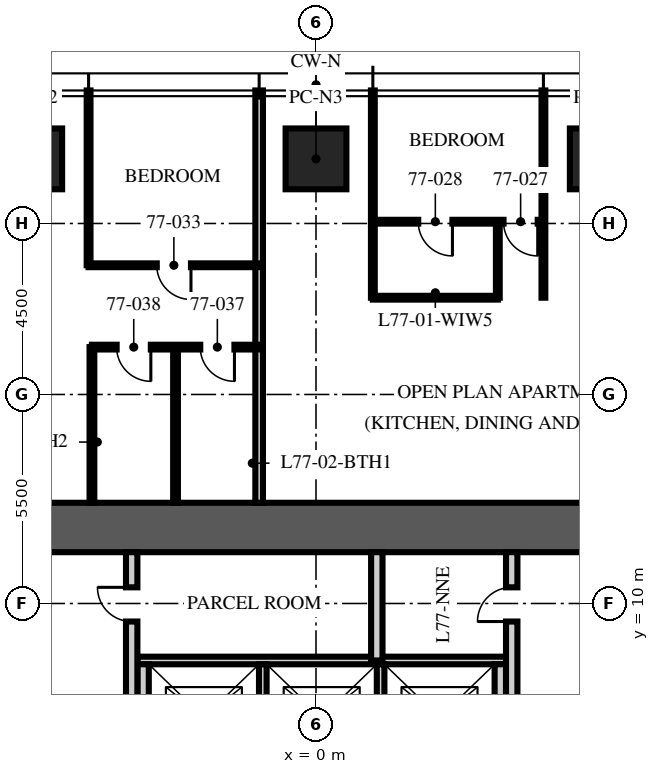
"""IFC4 building model, lengths in metres.
Left out: names, types, materials, properties, quantities, classifications, styles, units other than length and angle.
Written with IfcOpenShell. Run it as: python <this file> out.ifc"""

import sys

from ifc_helpers import new_model, si_unit, direction, frame, frame_2d, origin, origin_2d, place, context, subcontext, project, spatial, rectangle, extrude, element, fill, save


model = new_model("IFC4")
c1 = context("Model", 3, precision=1e-05, world=origin(), true_north=direction((0.0, 1.0)))
c2 = subcontext(c1, "Body", "Model", "MODEL_VIEW")
j1 = project(units=[si_unit("LENGTHUNIT", "METRE"), si_unit("PLANEANGLEUNIT", "RADIAN")], contexts=[c1])
p1 = place(None, origin())
s1 = spatial("IfcSite", under=j1, at=p1, CompositionType="ELEMENT")
p2 = place(p1, origin())
s2 = spatial("IfcBuilding", under=s1, at=p2, CompositionType="ELEMENT")
p3 = place(p2, frame((0.0, 0.0, 308.25)))
s3 = spatial("IfcBuildingStorey", under=s2, at=p3, CompositionType="ELEMENT", Elevation=308.25)
p4 = place(p3, frame((-15.5, 12.0, -0.25), z_axis=(0.0, 0.0, 1.0), x_axis=(1.0, 0.0, 0.0)))
e1 = element("IfcWall", 1, at=p4, inside=s3, PredefinedType="SHEAR", context=c2, shape_type="SweptSolid", body=[
    extrude(rectangle(XDim=31.0, YDim=1.3, at=frame_2d((15.5, 0.0))), origin(), (0.0, 0.0, 1.0), 3.75),
])
for number, where, z_axis, x_axis in (
    (2, (-7.48, 21.7, 0.0), (0.0, 0.0, 1.0), (1.0, 0.0, 0.0)),
    (3, (0.0, 21.7, 0.0), (0.0, 0.0, 1.0), (1.0, 0.0, 0.0)),
    (4, (7.48, 21.7, 0.0), (0.0, 0.0, 1.0), (1.0, 0.0, 0.0)),
):
    element("IfcColumn", number, at=place(p3, frame(where, z_axis=z_axis, x_axis=x_axis)), inside=s3, PredefinedType="COLUMN", context=c2, shape_type="SweptSolid", body=[
        extrude(rectangle(XDim=1.6, YDim=1.6, at=origin_2d()), origin(), (0.0, 0.0, 1.0), 3.75),
    ])
p5 = place(p3, frame((-4.7, 8.5, 0.0), z_axis=(0.0, 0.0, 1.0), x_axis=(1.0, 0.0, 0.0)))
e5 = element("IfcWall", 5, at=p5, inside=s3, PredefinedType="PARTITIONING", context=c2, shape_type="SweptSolid", body=[
    extrude(rectangle(XDim=9.7, YDim=0.2, at=frame_2d((4.85, 0.0))), origin(), (0.0, 0.0, 1.0), 3.5),
])
for number, where, z_axis, x_axis in (
    (6, (-4.55, 5.6, 0.0), (0.0, 0.0, 1.0), (0.0, 1.0, 0.0)),
    (7, (4.85, 5.6, 0.0), (0.0, 0.0, 1.0), (0.0, 1.0, 0.0)),
):
    element("IfcWall", number, at=place(p3, frame(where, z_axis=z_axis, x_axis=x_axis)), inside=s3, PredefinedType="PARTITIONING", context=c2, shape_type="SweptSolid", body=[
        extrude(rectangle(XDim=2.8, YDim=0.3, at=frame_2d((1.4, 0.0))), origin(), (0.0, 0.0, 1.0), 3.5),
    ])
for number, where, z_axis, x_axis in (
    (8, (-1.4, 5.6, 0.0), (0.0, 0.0, 1.0), (0.0, 1.0, 0.0)),
    (9, (1.7, 5.6, 0.0), (0.0, 0.0, 1.0), (0.0, 1.0, 0.0)),
):
    element("IfcWall", number, at=place(p3, frame(where, z_axis=z_axis, x_axis=x_axis)), inside=s3, PredefinedType="PARTITIONING", context=c2, shape_type="SweptSolid", body=[
        extrude(rectangle(XDim=2.8, YDim=0.2, at=frame_2d((1.4, 0.0))), origin(), (0.0, 0.0, 1.0), 3.5),
    ])
p6 = place(p3, frame((-4.85, 5.3, 0.0), z_axis=(0.0, 0.0, 1.0), x_axis=(0.0, 1.0, 0.0)))
e10 = element("IfcWall", 10, at=p6, inside=s3, PredefinedType="PARTITIONING", context=c2, shape_type="SweptSolid", body=[
    extrude(rectangle(XDim=6.05, YDim=0.3, at=frame_2d((3.025, 0.0))), origin(), (0.0, 0.0, 1.0), 3.5),
])
p7 = place(p6, frame((4.225, 0.0, 0.0)))
e11 = element("IfcOpeningElement", 11, at=p7, cuts=e10, PredefinedType="OPENING", context=c2, shape_type="SweptSolid", body=[
    extrude(rectangle(XDim=0.9, YDim=2.1, at=frame_2d((0.45, 1.05))), frame((0.0, 0.16, 0.0), z_axis=(0.0, -1.0, 0.0), x_axis=(1.0, 0.0, 0.0)), (0.0, 0.0, 1.0), 0.32),
])
p8 = place(p3, frame((5.15, 5.3, 0.0), z_axis=(0.0, 0.0, 1.0), x_axis=(0.0, 1.0, 0.0)))
e12 = element("IfcWall", 12, at=p8, inside=s3, PredefinedType="PARTITIONING", context=c2, shape_type="SweptSolid", body=[
    extrude(rectangle(XDim=6.05, YDim=0.3, at=frame_2d((3.025, 0.0))), origin(), (0.0, 0.0, 1.0), 3.5),
])
p9 = place(p8, frame((4.225, 0.0, 0.0)))
e13 = element("IfcOpeningElement", 13, at=p9, cuts=e12, PredefinedType="OPENING", context=c2, shape_type="SweptSolid", body=[
    extrude(rectangle(XDim=0.9, YDim=2.1, at=frame_2d((0.45, 1.05))), frame((0.0, 0.16, 0.0), z_axis=(0.0, -1.0, 0.0), x_axis=(1.0, 0.0, 0.0)), (0.0, 0.0, 1.0), 0.32),
])
p10 = place(p3, frame((1.6, 8.5, 0.0), z_axis=(0.0, 0.0, 1.0), x_axis=(0.0, 1.0, 0.0)))
e14 = element("IfcWall", 14, at=p10, inside=s3, PredefinedType="PARTITIONING", context=c2, shape_type="SweptSolid", body=[
    extrude(rectangle(XDim=2.85, YDim=0.3, at=frame_2d((1.425, 0.0))), origin(), (0.0, 0.0, 1.0), 3.5),
])
for number, where, z_axis, x_axis in (
    (15, (5.984, 18.046, 0.0), (0.0, 0.0, 1.0), (0.0, 1.0, 0.0)),
    (16, (1.496, 18.046, 0.0), (0.0, 0.0, 1.0), (0.0, 1.0, 0.0)),
):
    element("IfcWall", number, at=place(p3, frame(where, z_axis=z_axis, x_axis=x_axis)), inside=s3, PredefinedType="PARTITIONING", context=c2, shape_type="SweptSolid", body=[
        extrude(rectangle(XDim=5.454, YDim=0.1, at=frame_2d((2.727, 0.0))), origin(), (0.0, 0.0, 1.0), 3.01),
    ])
p11 = place(p3, frame((-1.496, 12.65, 0.0), z_axis=(0.0, 0.0, 1.0), x_axis=(0.0, 1.0, 0.0)))
e17 = element("IfcWall", 17, at=p11, inside=s3, PredefinedType="PARTITIONING", context=c2, shape_type="SweptSolid", body=[
    extrude(rectangle(XDim=10.85, YDim=0.2, at=frame_2d((5.425, 0.0))), origin(), (0.0, 0.0, 1.0), 3.01),
])
p12 = place(p3, frame((-5.984, 18.9, 0.0), z_axis=(0.0, 0.0, 1.0), x_axis=(0.0, 1.0, 0.0)))
e18 = element("IfcWall", 18, at=p12, inside=s3, PredefinedType="PARTITIONING", context=c2, shape_type="SweptSolid", body=[
    extrude(rectangle(XDim=4.6, YDim=0.1, at=frame_2d((2.3, 0.0))), origin(), (0.0, 0.0, 1.0), 3.01),
])
p13 = place(p3, frame((5.984, 20.046, 0.0), z_axis=(0.0, 0.0, 1.0), x_axis=(-1.0, 0.0, 0.0)))
e19 = element("IfcWall", 19, at=p13, inside=s3, PredefinedType="PARTITIONING", context=c2, shape_type="SweptSolid", body=[
    extrude(rectangle(XDim=4.488, YDim=0.1, at=frame_2d((2.244, 0.0))), origin(), (0.0, 0.0, 1.0), 2.91),
])
p14 = place(p13, frame((0.15, 0.0, 0.0)))
e20 = element("IfcOpeningElement", 20, at=p14, cuts=e19, PredefinedType="OPENING", context=c2, shape_type="SweptSolid", body=[
    extrude(rectangle(XDim=0.9, YDim=2.1, at=frame_2d((0.45, 1.05))), frame((0.0, 0.06, 0.0), z_axis=(0.0, -1.0, 0.0), x_axis=(1.0, 0.0, 0.0)), (0.0, 0.0, 1.0), 0.12),
])
p15 = place(p13, frame((2.394, 0.0, 0.0)))
e21 = element("IfcOpeningElement", 21, at=p15, cuts=e19, PredefinedType="OPENING", context=c2, shape_type="SweptSolid", body=[
    extrude(rectangle(XDim=0.9, YDim=2.1, at=frame_2d((0.45, 1.05))), frame((0.0, 0.06, 0.0), z_axis=(0.0, -1.0, 0.0), x_axis=(1.0, 0.0, 0.0)), (0.0, 0.0, 1.0), 0.12),
])
p16 = place(p3, frame((4.784, 18.046, 0.0), z_axis=(0.0, 0.0, 1.0), x_axis=(0.0, 1.0, 0.0)))
e22 = element("IfcWall", 22, at=p16, inside=s3, PredefinedType="PARTITIONING", context=c2, shape_type="SweptSolid", body=[
    extrude(rectangle(XDim=2.0, YDim=0.1, at=frame_2d((1.0, 0.0))), origin(), (0.0, 0.0, 1.0), 3.5),
])
p17 = place(p3, frame((4.784, 18.046, 0.0), z_axis=(0.0, 0.0, 1.0), x_axis=(-1.0, 0.0, 0.0)))
e23 = element("IfcWall", 23, at=p17, inside=s3, PredefinedType="PARTITIONING", context=c2, shape_type="SweptSolid", body=[
    extrude(rectangle(XDim=3.288, YDim=0.1, at=frame_2d((1.644, 0.0))), origin(), (0.0, 0.0, 1.0), 2.91),
])
p18 = place(p3, frame((-1.496, 18.9, 0.0), z_axis=(0.0, 0.0, 1.0), x_axis=(-1.0, 0.0, 0.0)))
e24 = element("IfcWall", 24, at=p18, inside=s3, PredefinedType="PARTITIONING", context=c2, shape_type="SweptSolid", body=[
    extrude(rectangle(XDim=4.488, YDim=0.1, at=frame_2d((2.244, 0.0))), origin(), (0.0, 0.0, 1.0), 2.91),
])
p19 = place(p18, frame((1.794, 0.0, 0.0)))
e25 = element("IfcOpeningElement", 25, at=p19, cuts=e24, PredefinedType="OPENING", context=c2, shape_type="SweptSolid", body=[
    extrude(rectangle(XDim=0.9, YDim=2.1, at=frame_2d((0.45, 1.05))), frame((0.0, 0.06, 0.0), z_axis=(0.0, -1.0, 0.0), x_axis=(1.0, 0.0, 0.0)), (0.0, 0.0, 1.0), 0.12),
])
p20 = place(p3, frame((-1.496, 16.746, 0.0), z_axis=(0.0, 0.0, 1.0), x_axis=(-1.0, 0.0, 0.0)))
e26 = element("IfcWall", 26, at=p20, inside=s3, PredefinedType="PARTITIONING", context=c2, shape_type="SweptSolid", body=[
    extrude(rectangle(XDim=4.4, YDim=0.125, at=frame_2d((2.2, 0.0))), origin(), (0.0, 0.0, 1.0), 2.91),
])
p21 = place(p20, frame((0.65, 0.0, 0.0)))
e27 = element("IfcOpeningElement", 27, at=p21, cuts=e26, PredefinedType="OPENING", context=c2, shape_type="SweptSolid", body=[
    extrude(rectangle(XDim=0.9, YDim=2.1, at=frame_2d((0.45, 1.05))), frame((0.0, 0.073, 0.0), z_axis=(0.0, -1.0, 0.0), x_axis=(1.0, 0.0, 0.0)), (0.0, 0.0, 1.0), 0.145),
])
p22 = place(p20, frame((2.85, 0.0, 0.0)))
e28 = element("IfcOpeningElement", 28, at=p22, cuts=e26, PredefinedType="OPENING", context=c2, shape_type="SweptSolid", body=[
    extrude(rectangle(XDim=0.9, YDim=2.1, at=frame_2d((0.45, 1.05))), frame((0.0, 0.073, 0.0), z_axis=(0.0, -1.0, 0.0), x_axis=(1.0, 0.0, 0.0)), (0.0, 0.0, 1.0), 0.145),
])
p23 = place(p3, frame((-3.696, 12.65, 0.0), z_axis=(0.0, 0.0, 1.0), x_axis=(0.0, 1.0, 0.0)))
e29 = element("IfcWall", 29, at=p23, inside=s3, PredefinedType="PARTITIONING", context=c2, shape_type="SweptSolid", body=[
    extrude(rectangle(XDim=4.096, YDim=0.125, at=frame_2d((2.048, 0.0))), origin(), (0.0, 0.0, 1.0), 2.91),
])
p24 = place(p3, frame((-5.896, 12.65, 0.0), z_axis=(0.0, 0.0, 1.0), x_axis=(0.0, 1.0, 0.0)))
e30 = element("IfcWall", 30, at=p24, inside=s3, PredefinedType="PARTITIONING", context=c2, shape_type="SweptSolid", body=[
    extrude(rectangle(XDim=4.096, YDim=0.125, at=frame_2d((2.048, 0.0))), origin(), (0.0, 0.0, 1.0), 3.5),
])
p25 = place(p7, origin())
e31 = element("IfcDoor", 31, at=p25, inside=s3, OperationType="SINGLE_SWING_RIGHT", PredefinedType="DOOR", context=c2, shape_type="SweptSolid", body=[
    extrude(rectangle(XDim=0.9, YDim=2.1, at=frame_2d((0.45, 1.05))), frame((0.0, 0.025, 0.0), z_axis=(0.0, -1.0, 0.0), x_axis=(1.0, 0.0, 0.0)), (0.0, 0.0, 1.0), 0.05),
])
fill(e11, e31)
p26 = place(p9, origin())
e32 = element("IfcDoor", 32, at=p26, inside=s3, OperationType="SINGLE_SWING_LEFT", PredefinedType="DOOR", context=c2, shape_type="SweptSolid", body=[
    extrude(rectangle(XDim=0.9, YDim=2.1, at=frame_2d((0.45, 1.05))), frame((0.0, 0.025, 0.0), z_axis=(0.0, -1.0, 0.0), x_axis=(1.0, 0.0, 0.0)), (0.0, 0.0, 1.0), 0.05),
])
fill(e13, e32)
p27 = place(p14, origin())
e33 = element("IfcDoor", 33, at=p27, inside=s3, OperationType="SINGLE_SWING_LEFT", PredefinedType="DOOR", context=c2, shape_type="SweptSolid", body=[
    extrude(rectangle(XDim=0.9, YDim=2.1, at=frame_2d((0.45, 1.05))), frame((0.0, 0.025, 0.0), z_axis=(0.0, -1.0, 0.0), x_axis=(1.0, 0.0, 0.0)), (0.0, 0.0, 1.0), 0.05),
])
fill(e20, e33)
p28 = place(p15, origin())
e34 = element("IfcDoor", 34, at=p28, inside=s3, OperationType="SINGLE_SWING_LEFT", PredefinedType="DOOR", context=c2, shape_type="SweptSolid", body=[
    extrude(rectangle(XDim=0.9, YDim=2.1, at=frame_2d((0.45, 1.05))), frame((0.0, 0.025, 0.0), z_axis=(0.0, -1.0, 0.0), x_axis=(1.0, 0.0, 0.0)), (0.0, 0.0, 1.0), 0.05),
])
fill(e21, e34)
p29 = place(p19, origin())
e35 = element("IfcDoor", 35, at=p29, inside=s3, OperationType="SINGLE_SWING_LEFT", PredefinedType="DOOR", context=c2, shape_type="SweptSolid", body=[
    extrude(rectangle(XDim=0.9, YDim=2.1, at=frame_2d((0.45, 1.05))), frame((0.0, 0.025, 0.0), z_axis=(0.0, -1.0, 0.0), x_axis=(1.0, 0.0, 0.0)), (0.0, 0.0, 1.0), 0.05),
])
fill(e25, e35)
p30 = place(p21, origin())
e36 = element("IfcDoor", 36, at=p30, inside=s3, OperationType="SINGLE_SWING_LEFT", PredefinedType="DOOR", context=c2, shape_type="SweptSolid", body=[
    extrude(rectangle(XDim=0.9, YDim=2.1, at=frame_2d((0.45, 1.05))), frame((0.0, 0.025, 0.0), z_axis=(0.0, -1.0, 0.0), x_axis=(1.0, 0.0, 0.0)), (0.0, 0.0, 1.0), 0.05),
])
fill(e27, e36)
p31 = place(p22, origin())
e37 = element("IfcDoor", 37, at=p31, inside=s3, OperationType="SINGLE_SWING_LEFT", PredefinedType="DOOR", context=c2, shape_type="SweptSolid", body=[
    extrude(rectangle(XDim=0.9, YDim=2.1, at=frame_2d((0.45, 1.05))), frame((0.0, 0.025, 0.0), z_axis=(0.0, -1.0, 0.0), x_axis=(1.0, 0.0, 0.0)), (0.0, 0.0, 1.0), 0.05),
])
fill(e28, e37)
save(model, sys.argv[1])
